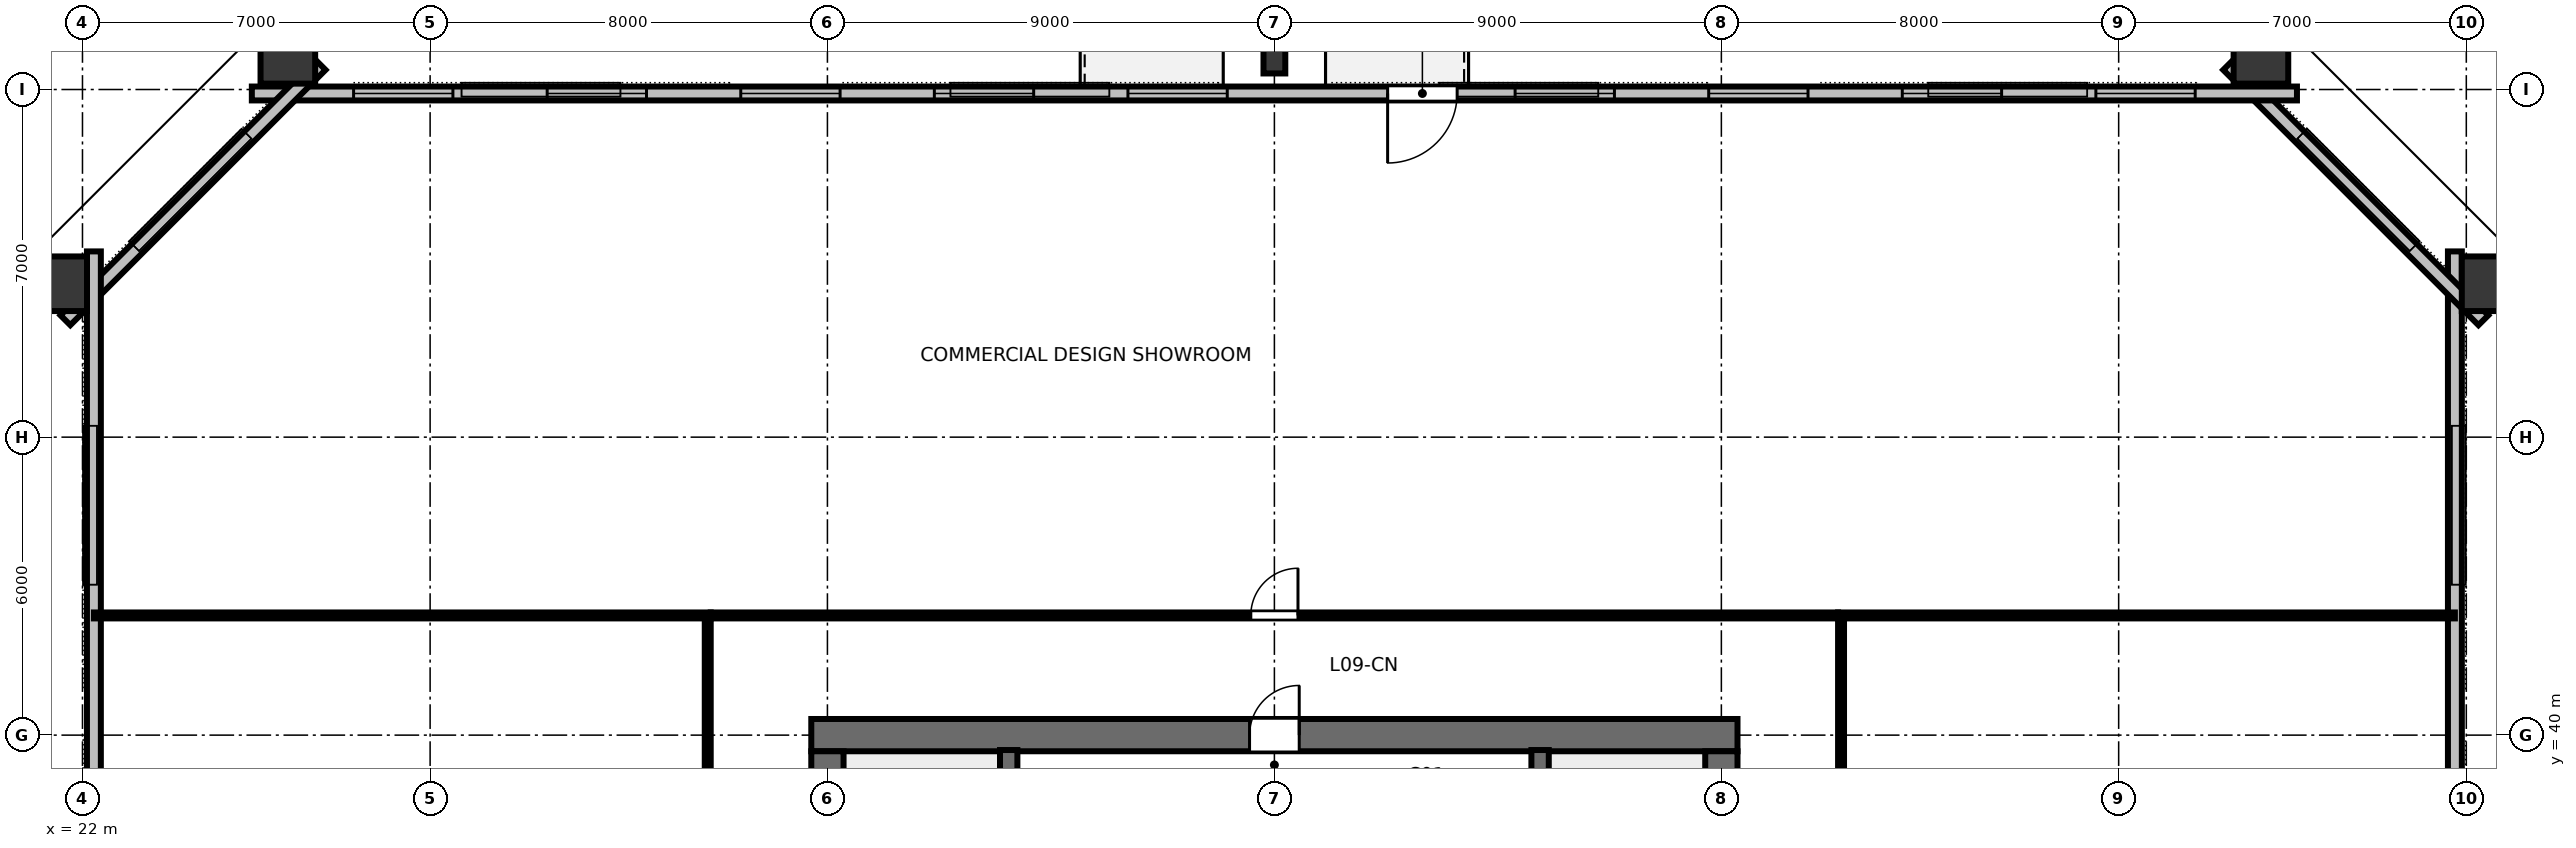
"""IFC4 building model, lengths in metres.
Left out: names, types, materials, properties, quantities, classifications, styles, units other than length and angle.
Written with IfcOpenShell. Run it as: python <this file> out.ifc"""

import sys

from ifc_helpers import new_model, si_unit, direction, frame, frame_2d, origin, origin_2d, place, context, subcontext, project, spatial, rectangle, hollow_rectangle, i_section, extrude, element, fill, save


model = new_model("IFC4")
c1 = context("Model", 3, precision=1e-05, world=origin(), true_north=direction((0.0, 1.0)))
c2 = subcontext(c1, "Body", "Model", "MODEL_VIEW")
j1 = project(units=[si_unit("LENGTHUNIT", "METRE"), si_unit("PLANEANGLEUNIT", "RADIAN")], contexts=[c1])
p1 = place(None, origin())
s1 = spatial("IfcSite", under=j1, at=p1, CompositionType="ELEMENT")
p2 = place(p1, origin())
s2 = spatial("IfcBuilding", under=s1, at=p2, CompositionType="ELEMENT")
p3 = place(p2, frame((0.0, 0.0, 38.8)))
s3 = spatial("IfcBuildingStorey", under=s2, at=p3, CompositionType="ELEMENT", Elevation=38.8)
p4 = place(p3, frame((36.675, 40.0, 0.0), z_axis=(0.0, 0.0, 1.0), x_axis=(1.0, 0.0, 0.0)))
e1 = element("IfcWall", 1, at=p4, inside=s3, PredefinedType="SHEAR", context=c2, shape_type="SweptSolid", body=[
    extrude(rectangle(XDim=18.65, YDim=0.65, at=frame_2d((9.325, 0.0))), origin(), (0.0, 0.0, 1.0), 3.36),
])
p5 = place(p4, frame((8.825, 0.0, 0.0)))
e2 = element("IfcOpeningElement", 2, at=p5, cuts=e1, PredefinedType="OPENING", context=c2, shape_type="SweptSolid", body=[
    extrude(rectangle(XDim=1.0, YDim=2.15, at=frame_2d((0.5, 1.075))), frame((0.0, 0.335, 0.0), z_axis=(0.0, -1.0, 0.0), x_axis=(1.0, 0.0, 0.0)), (0.0, 0.0, 1.0), 0.67),
])
p6 = place(p3, frame((37.0, 24.325, 0.0), z_axis=(0.0, 0.0, 1.0), x_axis=(0.0, 1.0, 0.0)))
e3 = element("IfcWall", 3, at=p6, inside=s3, PredefinedType="SHEAR", context=c2, shape_type="SweptSolid", body=[
    extrude(rectangle(XDim=15.35, YDim=0.65, at=frame_2d((7.675, 0.0))), origin(), (0.0, 0.0, 1.0), 3.36),
])
p7 = place(p6, frame((5.2, 0.0, 0.0)))
e4 = element("IfcOpeningElement", 4, at=p7, cuts=e3, PredefinedType="OPENING", context=c2, shape_type="SweptSolid", body=[
    extrude(rectangle(XDim=1.15, YDim=2.15, at=frame_2d((0.575, 1.075))), frame((0.0, 0.335, 0.0), z_axis=(0.0, -1.0, 0.0), x_axis=(1.0, 0.0, 0.0)), (0.0, 0.0, 1.0), 0.67),
])
p8 = place(p3, frame((55.0, 24.325, 0.0), z_axis=(0.0, 0.0, 1.0), x_axis=(0.0, 1.0, 0.0)))
e5 = element("IfcWall", 5, at=p8, inside=s3, PredefinedType="SHEAR", context=c2, shape_type="SweptSolid", body=[
    extrude(rectangle(XDim=15.35, YDim=0.65, at=frame_2d((7.675, 0.0))), origin(), (0.0, 0.0, 1.0), 3.36),
])
p9 = place(p8, frame((5.2, 0.0, 0.0)))
e6 = element("IfcOpeningElement", 6, at=p9, cuts=e5, PredefinedType="OPENING", context=c2, shape_type="SweptSolid", body=[
    extrude(rectangle(XDim=1.15, YDim=2.15, at=frame_2d((0.575, 1.075))), frame((0.0, 0.335, 0.0), z_axis=(0.0, -1.0, 0.0), x_axis=(1.0, 0.0, 0.0)), (0.0, 0.0, 1.0), 0.67),
])
for number, where, z_axis, x_axis in (
    (7, (70.559, 49.089, 0.0), (0.0, 0.0, 1.0), (0.0, 1.0, 0.0)),
    (8, (65.865, 53.768, 0.0), (0.0, 0.0, 1.0), (1.0, 0.0, 0.0)),
):
    element("IfcColumn", number, at=place(p3, frame(where, z_axis=z_axis, x_axis=x_axis)), inside=s3, PredefinedType="COLUMN", context=c2, shape_type="SweptSolid", body=[
        extrude(hollow_rectangle(XDim=1.1, YDim=1.3, WallThickness=0.07, at=origin_2d()), origin(), (0.0, 0.0, 1.0), 3.358),
    ])
p10 = place(p3, frame((46.0, 53.58, 0.0), z_axis=(0.0, 0.0, 1.0), x_axis=(1.0, 0.0, 0.0)))
e9 = element("IfcColumn", 9, at=p10, inside=s3, PredefinedType="COLUMN", context=c2, shape_type="SweptSolid", body=[
    extrude(i_section(OverallWidth=0.439, OverallDepth=0.514, WebThickness=0.06, FlangeThickness=0.097, FilletRadius=0.025, at=origin_2d()), origin(), (0.0, 0.0, 1.0), 3.358),
])
for number, where, z_axis, x_axis in (
    (10, (26.135, 53.768, 0.0), (0.0, 0.0, 1.0), (1.0, 0.0, 0.0)),
    (11, (21.441, 49.089, 0.0), (0.0, 0.0, 1.0), (0.0, 1.0, 0.0)),
):
    element("IfcColumn", number, at=place(p3, frame(where, z_axis=z_axis, x_axis=x_axis)), inside=s3, PredefinedType="COLUMN", context=c2, shape_type="SweptSolid", body=[
        extrude(hollow_rectangle(XDim=1.1, YDim=1.3, WallThickness=0.07, at=origin_2d()), origin(), (0.0, 0.0, 1.0), 3.358),
    ])
p11 = place(p3, frame((69.77, 14.26, 0.0), z_axis=(0.0, 0.0, 1.0), x_axis=(0.0, 1.0, 0.0)))
e12 = element("IfcWall", 12, at=p11, inside=s3, PredefinedType="STANDARD", context=c2, shape_type="SweptSolid", body=[
    extrude(rectangle(XDim=35.48, YDim=0.28, at=frame_2d((17.74, 0.0))), origin(), (0.0, 0.0, 1.0), 3.36),
])
p12 = place(p3, frame((70.344, 48.354, 0.0), z_axis=(0.0, 0.0, 1.0), x_axis=(-0.707106781187, 0.707106781187, 0.0)))
e13 = element("IfcWall", 13, at=p12, inside=s3, PredefinedType="STANDARD", context=c2, shape_type="SweptSolid", body=[
    extrude(rectangle(XDim=7.268, YDim=0.28, at=frame_2d((3.634, 0.0))), origin(), (0.0, 0.0, 1.0), 3.36),
])
p13 = place(p3, frame((66.59, 52.92, 0.0), z_axis=(0.0, 0.0, 1.0), x_axis=(-1.0, 0.0, 0.0)))
e14 = element("IfcWall", 14, at=p13, inside=s3, PredefinedType="STANDARD", context=c2, shape_type="SweptSolid", body=[
    extrude(rectangle(XDim=41.18, YDim=0.28, at=frame_2d((20.59, 0.0))), origin(), (0.0, 0.0, 1.0), 3.36),
])
p14 = place(p13, frame((16.91, 0.0, 0.0)))
e15 = element("IfcOpeningElement", 15, at=p14, cuts=e14, PredefinedType="OPENING", context=c2, shape_type="SweptSolid", body=[
    extrude(rectangle(XDim=1.4, YDim=2.15, at=frame_2d((0.7, 1.075))), frame((0.0, 0.15, 0.0), z_axis=(0.0, -1.0, 0.0), x_axis=(1.0, 0.0, 0.0)), (0.0, 0.0, 1.0), 0.3),
])
p15 = place(p13, frame((2.049, 0.0, 0.8)))
e16 = element("IfcOpeningElement", 16, at=p15, cuts=e14, PredefinedType="OPENING", context=c2, shape_type="SweptSolid", body=[
    extrude(rectangle(XDim=2.0, YDim=1.95, at=frame_2d((1.0, 0.975))), frame((0.0, 0.15, 0.0), z_axis=(0.0, -1.0, 0.0), x_axis=(1.0, 0.0, 0.0)), (0.0, 0.0, 1.0), 0.3),
])
p16 = place(p13, frame((5.947, 0.0, 0.8)))
e17 = element("IfcOpeningElement", 17, at=p16, cuts=e14, PredefinedType="OPENING", context=c2, shape_type="SweptSolid", body=[
    extrude(rectangle(XDim=2.0, YDim=1.95, at=frame_2d((1.0, 0.975))), frame((0.0, 0.15, 0.0), z_axis=(0.0, -1.0, 0.0), x_axis=(1.0, 0.0, 0.0)), (0.0, 0.0, 1.0), 0.3),
])
p17 = place(p13, frame((9.845, 0.0, 0.8)))
e18 = element("IfcOpeningElement", 18, at=p17, cuts=e14, PredefinedType="OPENING", context=c2, shape_type="SweptSolid", body=[
    extrude(rectangle(XDim=2.0, YDim=1.95, at=frame_2d((1.0, 0.975))), frame((0.0, 0.15, 0.0), z_axis=(0.0, -1.0, 0.0), x_axis=(1.0, 0.0, 0.0)), (0.0, 0.0, 1.0), 0.3),
])
p18 = place(p13, frame((13.743, 0.0, 0.8)))
e19 = element("IfcOpeningElement", 19, at=p18, cuts=e14, PredefinedType="OPENING", context=c2, shape_type="SweptSolid", body=[
    extrude(rectangle(XDim=2.0, YDim=1.95, at=frame_2d((1.0, 0.975))), frame((0.0, 0.15, 0.0), z_axis=(0.0, -1.0, 0.0), x_axis=(1.0, 0.0, 0.0)), (0.0, 0.0, 1.0), 0.3),
])
p19 = place(p13, frame((21.539, 0.0, 0.8)))
e20 = element("IfcOpeningElement", 20, at=p19, cuts=e14, PredefinedType="OPENING", context=c2, shape_type="SweptSolid", body=[
    extrude(rectangle(XDim=2.0, YDim=1.95, at=frame_2d((1.0, 0.975))), frame((0.0, 0.15, 0.0), z_axis=(0.0, -1.0, 0.0), x_axis=(1.0, 0.0, 0.0)), (0.0, 0.0, 1.0), 0.3),
])
p20 = place(p13, frame((25.437, 0.0, 0.8)))
e21 = element("IfcOpeningElement", 21, at=p20, cuts=e14, PredefinedType="OPENING", context=c2, shape_type="SweptSolid", body=[
    extrude(rectangle(XDim=2.0, YDim=1.95, at=frame_2d((1.0, 0.975))), frame((0.0, 0.15, 0.0), z_axis=(0.0, -1.0, 0.0), x_axis=(1.0, 0.0, 0.0)), (0.0, 0.0, 1.0), 0.3),
])
p21 = place(p13, frame((29.335, 0.0, 0.8)))
e22 = element("IfcOpeningElement", 22, at=p21, cuts=e14, PredefinedType="OPENING", context=c2, shape_type="SweptSolid", body=[
    extrude(rectangle(XDim=2.0, YDim=1.95, at=frame_2d((1.0, 0.975))), frame((0.0, 0.15, 0.0), z_axis=(0.0, -1.0, 0.0), x_axis=(1.0, 0.0, 0.0)), (0.0, 0.0, 1.0), 0.3),
])
p22 = place(p13, frame((33.233, 0.0, 0.8)))
e23 = element("IfcOpeningElement", 23, at=p22, cuts=e14, PredefinedType="OPENING", context=c2, shape_type="SweptSolid", body=[
    extrude(rectangle(XDim=2.0, YDim=1.95, at=frame_2d((1.0, 0.975))), frame((0.0, 0.15, 0.0), z_axis=(0.0, -1.0, 0.0), x_axis=(1.0, 0.0, 0.0)), (0.0, 0.0, 1.0), 0.3),
])
p23 = place(p13, frame((37.131, 0.0, 0.8)))
e24 = element("IfcOpeningElement", 24, at=p23, cuts=e14, PredefinedType="OPENING", context=c2, shape_type="SweptSolid", body=[
    extrude(rectangle(XDim=2.0, YDim=1.95, at=frame_2d((1.0, 0.975))), frame((0.0, 0.15, 0.0), z_axis=(0.0, -1.0, 0.0), x_axis=(1.0, 0.0, 0.0)), (0.0, 0.0, 1.0), 0.3),
])
p24 = place(p3, frame((26.795, 53.494, 0.0), z_axis=(0.0, 0.0, 1.0), x_axis=(-0.707106781187, -0.707106781187, 0.0)))
e25 = element("IfcWall", 25, at=p24, inside=s3, PredefinedType="STANDARD", context=c2, shape_type="SweptSolid", body=[
    extrude(rectangle(XDim=7.268, YDim=0.28, at=frame_2d((3.634, 0.0))), origin(), (0.0, 0.0, 1.0), 3.36),
])
p25 = place(p3, frame((22.23, 49.74, 0.0), z_axis=(0.0, 0.0, 1.0), x_axis=(0.0, -1.0, 0.0)))
e26 = element("IfcWall", 26, at=p25, inside=s3, PredefinedType="STANDARD", context=c2, shape_type="SweptSolid", body=[
    extrude(rectangle(XDim=35.48, YDim=0.28, at=frame_2d((17.74, 0.0))), origin(), (0.0, 0.0, 1.0), 3.36),
])
for number, where, z_axis, x_axis in (
    (27, (40.65, 32.0, 0.0), (0.0, 0.0, 1.0), (0.0, 1.0, 0.0)),
    (28, (51.35, 32.0, 0.0), (0.0, 0.0, 1.0), (0.0, 1.0, 0.0)),
):
    element("IfcWall", number, at=place(p3, frame(where, z_axis=z_axis, x_axis=x_axis)), inside=s3, PredefinedType="SHEAR", context=c2, shape_type="SweptSolid", body=[
        extrude(rectangle(XDim=7.7, YDim=0.35, at=frame_2d((3.85, 0.0))), origin(), (0.0, 0.0, 1.0), 3.6),
    ])
p26 = place(p3, frame((34.65, 42.41, 0.0), z_axis=(0.0, 0.0, 1.0), x_axis=(1.0, 0.0, 0.0)))
e29 = element("IfcWall", 29, at=p26, inside=s3, PredefinedType="PARTITIONING", context=c2, shape_type="SweptSolid", body=[
    extrude(rectangle(XDim=22.7, YDim=0.12, at=frame_2d((11.35, 0.0))), origin(), (0.0, 0.0, 1.0), 2.64),
])
p27 = place(p26, frame((10.875, 0.0, 0.0)))
e30 = element("IfcOpeningElement", 30, at=p27, cuts=e29, PredefinedType="OPENING", context=c2, shape_type="SweptSolid", body=[
    extrude(rectangle(XDim=0.95, YDim=2.15, at=frame_2d((0.475, 1.075))), frame((0.0, 0.07, 0.0), z_axis=(0.0, -1.0, 0.0), x_axis=(1.0, 0.0, 0.0)), (0.0, 0.0, 1.0), 0.14),
])
p28 = place(p3, frame((34.59, 21.65, 0.0), z_axis=(0.0, 0.0, 1.0), x_axis=(0.0, 1.0, 0.0)))
e31 = element("IfcWall", 31, at=p28, inside=s3, PredefinedType="PARTITIONING", context=c2, shape_type="SweptSolid", body=[
    extrude(rectangle(XDim=20.7, YDim=0.12, at=frame_2d((10.35, 0.0))), origin(), (0.0, 0.0, 1.0), 2.64),
])
p29 = place(p28, frame((3.402, 0.0, 0.0)))
e32 = element("IfcOpeningElement", 32, at=p29, cuts=e31, PredefinedType="OPENING", context=c2, shape_type="SweptSolid", body=[
    extrude(rectangle(XDim=0.95, YDim=2.15, at=frame_2d((0.475, 1.075))), frame((0.0, 0.07, 0.0), z_axis=(0.0, -1.0, 0.0), x_axis=(1.0, 0.0, 0.0)), (0.0, 0.0, 1.0), 0.14),
])
p30 = place(p28, frame((9.912, 0.0, 0.0)))
e33 = element("IfcOpeningElement", 33, at=p30, cuts=e31, PredefinedType="OPENING", context=c2, shape_type="SweptSolid", body=[
    extrude(rectangle(XDim=0.95, YDim=2.15, at=frame_2d((0.475, 1.075))), frame((0.0, 0.07, 0.0), z_axis=(0.0, -1.0, 0.0), x_axis=(1.0, 0.0, 0.0)), (0.0, 0.0, 1.0), 0.14),
])
p31 = place(p28, frame((16.385, 0.0, 0.0)))
e34 = element("IfcOpeningElement", 34, at=p31, cuts=e31, PredefinedType="OPENING", context=c2, shape_type="SweptSolid", body=[
    extrude(rectangle(XDim=0.95, YDim=2.15, at=frame_2d((0.475, 1.075))), frame((0.0, 0.07, 0.0), z_axis=(0.0, -1.0, 0.0), x_axis=(1.0, 0.0, 0.0)), (0.0, 0.0, 1.0), 0.14),
])
p32 = place(p3, frame((57.41, 21.65, 0.0), z_axis=(0.0, 0.0, 1.0), x_axis=(0.0, 1.0, 0.0)))
e35 = element("IfcWall", 35, at=p32, inside=s3, PredefinedType="PARTITIONING", context=c2, shape_type="SweptSolid", body=[
    extrude(rectangle(XDim=20.7, YDim=0.12, at=frame_2d((10.35, 0.0))), origin(), (0.0, 0.0, 1.0), 2.64),
])
p33 = place(p32, frame((9.875, 0.0, 0.0)))
e36 = element("IfcOpeningElement", 36, at=p33, cuts=e35, PredefinedType="OPENING", context=c2, shape_type="SweptSolid", body=[
    extrude(rectangle(XDim=0.95, YDim=2.15, at=frame_2d((0.475, 1.075))), frame((0.0, 0.07, 0.0), z_axis=(0.0, -1.0, 0.0), x_axis=(1.0, 0.0, 0.0)), (0.0, 0.0, 1.0), 0.14),
])
for number, where, z_axis, x_axis in (
    (37, (34.65, 42.41, 0.0), (0.0, 0.0, 1.0), (-1.0, 0.0, 0.0)),
    (38, (57.35, 42.41, 0.0), (0.0, 0.0, 1.0), (1.0, 0.0, 0.0)),
):
    element("IfcWall", number, at=place(p3, frame(where, z_axis=z_axis, x_axis=x_axis)), inside=s3, PredefinedType="PARTITIONING", context=c2, shape_type="SweptSolid", body=[
        extrude(rectangle(XDim=12.42, YDim=0.12, at=frame_2d((6.21, 0.0))), origin(), (0.0, 0.0, 1.0), 2.64),
    ])
p34 = place(p14, origin())
e39 = element("IfcDoor", 39, at=p34, inside=s3, OperationType="SINGLE_SWING_RIGHT", PredefinedType="DOOR", context=c2, shape_type="SweptSolid", body=[
    extrude(rectangle(XDim=1.4, YDim=2.15, at=frame_2d((0.7, 1.075))), frame((0.0, 0.025, 0.0), z_axis=(0.0, -1.0, 0.0), x_axis=(1.0, 0.0, 0.0)), (0.0, 0.0, 1.0), 0.05),
])
fill(e15, e39)
p35 = place(p15, origin())
e40 = element("IfcWindow", 40, at=p35, inside=s3, PartitioningType="SINGLE_PANEL", PredefinedType="WINDOW", context=c2, shape_type="SweptSolid", body=[
    extrude(rectangle(XDim=2.0, YDim=1.95, at=frame_2d((1.0, 0.975))), frame((0.0, 0.03, 0.0), z_axis=(0.0, -1.0, 0.0), x_axis=(1.0, 0.0, 0.0)), (0.0, 0.0, 1.0), 0.06),
])
fill(e16, e40)
p36 = place(p16, origin())
e41 = element("IfcWindow", 41, at=p36, inside=s3, PartitioningType="SINGLE_PANEL", PredefinedType="WINDOW", context=c2, shape_type="SweptSolid", body=[
    extrude(rectangle(XDim=2.0, YDim=1.95, at=frame_2d((1.0, 0.975))), frame((0.0, 0.03, 0.0), z_axis=(0.0, -1.0, 0.0), x_axis=(1.0, 0.0, 0.0)), (0.0, 0.0, 1.0), 0.06),
])
fill(e17, e41)
p37 = place(p17, origin())
e42 = element("IfcWindow", 42, at=p37, inside=s3, PartitioningType="SINGLE_PANEL", PredefinedType="WINDOW", context=c2, shape_type="SweptSolid", body=[
    extrude(rectangle(XDim=2.0, YDim=1.95, at=frame_2d((1.0, 0.975))), frame((0.0, 0.03, 0.0), z_axis=(0.0, -1.0, 0.0), x_axis=(1.0, 0.0, 0.0)), (0.0, 0.0, 1.0), 0.06),
])
fill(e18, e42)
p38 = place(p18, origin())
e43 = element("IfcWindow", 43, at=p38, inside=s3, PartitioningType="SINGLE_PANEL", PredefinedType="WINDOW", context=c2, shape_type="SweptSolid", body=[
    extrude(rectangle(XDim=2.0, YDim=1.95, at=frame_2d((1.0, 0.975))), frame((0.0, 0.03, 0.0), z_axis=(0.0, -1.0, 0.0), x_axis=(1.0, 0.0, 0.0)), (0.0, 0.0, 1.0), 0.06),
])
fill(e19, e43)
p39 = place(p19, origin())
e44 = element("IfcWindow", 44, at=p39, inside=s3, PartitioningType="SINGLE_PANEL", PredefinedType="WINDOW", context=c2, shape_type="SweptSolid", body=[
    extrude(rectangle(XDim=2.0, YDim=1.95, at=frame_2d((1.0, 0.975))), frame((0.0, 0.03, 0.0), z_axis=(0.0, -1.0, 0.0), x_axis=(1.0, 0.0, 0.0)), (0.0, 0.0, 1.0), 0.06),
])
fill(e20, e44)
p40 = place(p20, origin())
e45 = element("IfcWindow", 45, at=p40, inside=s3, PartitioningType="SINGLE_PANEL", PredefinedType="WINDOW", context=c2, shape_type="SweptSolid", body=[
    extrude(rectangle(XDim=2.0, YDim=1.95, at=frame_2d((1.0, 0.975))), frame((0.0, 0.03, 0.0), z_axis=(0.0, -1.0, 0.0), x_axis=(1.0, 0.0, 0.0)), (0.0, 0.0, 1.0), 0.06),
])
fill(e21, e45)
p41 = place(p21, origin())
e46 = element("IfcWindow", 46, at=p41, inside=s3, PartitioningType="SINGLE_PANEL", PredefinedType="WINDOW", context=c2, shape_type="SweptSolid", body=[
    extrude(rectangle(XDim=2.0, YDim=1.95, at=frame_2d((1.0, 0.975))), frame((0.0, 0.03, 0.0), z_axis=(0.0, -1.0, 0.0), x_axis=(1.0, 0.0, 0.0)), (0.0, 0.0, 1.0), 0.06),
])
fill(e22, e46)
p42 = place(p22, origin())
e47 = element("IfcWindow", 47, at=p42, inside=s3, PartitioningType="SINGLE_PANEL", PredefinedType="WINDOW", context=c2, shape_type="SweptSolid", body=[
    extrude(rectangle(XDim=2.0, YDim=1.95, at=frame_2d((1.0, 0.975))), frame((0.0, 0.03, 0.0), z_axis=(0.0, -1.0, 0.0), x_axis=(1.0, 0.0, 0.0)), (0.0, 0.0, 1.0), 0.06),
])
fill(e23, e47)
p43 = place(p23, origin())
e48 = element("IfcWindow", 48, at=p43, inside=s3, PartitioningType="SINGLE_PANEL", PredefinedType="WINDOW", context=c2, shape_type="SweptSolid", body=[
    extrude(rectangle(XDim=2.0, YDim=1.95, at=frame_2d((1.0, 0.975))), frame((0.0, 0.03, 0.0), z_axis=(0.0, -1.0, 0.0), x_axis=(1.0, 0.0, 0.0)), (0.0, 0.0, 1.0), 0.06),
])
fill(e24, e48)
p44 = place(p5, origin())
e49 = element("IfcDoor", 49, at=p44, inside=s3, OperationType="SINGLE_SWING_RIGHT", PredefinedType="DOOR", context=c2, shape_type="SweptSolid", body=[
    extrude(rectangle(XDim=1.0, YDim=2.15, at=frame_2d((0.5, 1.075))), frame((0.0, 0.025, 0.0), z_axis=(0.0, -1.0, 0.0), x_axis=(1.0, 0.0, 0.0)), (0.0, 0.0, 1.0), 0.05),
])
fill(e2, e49)
p45 = place(p27, origin())
e50 = element("IfcDoor", 50, at=p45, inside=s3, OperationType="SINGLE_SWING_RIGHT", PredefinedType="DOOR", context=c2, shape_type="SweptSolid", body=[
    extrude(rectangle(XDim=0.95, YDim=2.15, at=frame_2d((0.475, 1.075))), frame((0.0, 0.025, 0.0), z_axis=(0.0, -1.0, 0.0), x_axis=(1.0, 0.0, 0.0)), (0.0, 0.0, 1.0), 0.05),
])
fill(e30, e50)
save(model, sys.argv[1])
